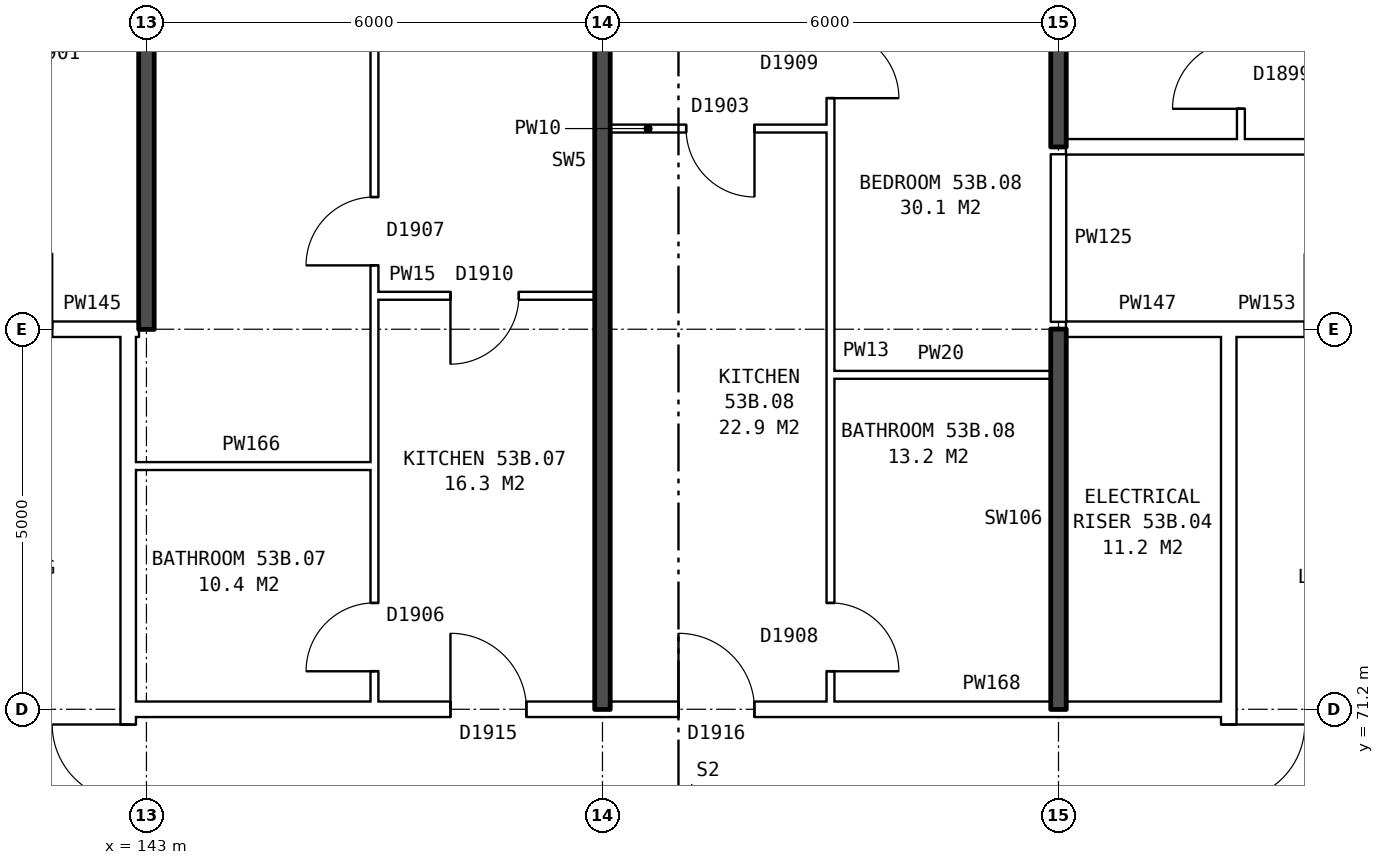
"""IFC4 building model, lengths in metres.
Left out: names, types, materials, properties, quantities, classifications, styles, units other than length and angle.
Written with IfcOpenShell. Run it as: python <this file> out.ifc"""

import sys

from ifc_helpers import new_model, si_unit, direction, frame, frame_2d, origin, place, context, subcontext, project, spatial, rectangle, extrude, element, fill, save


model = new_model("IFC4")
c1 = context("Model", 3, precision=1e-05, world=origin(), true_north=direction((0.0, 1.0)))
c2 = subcontext(c1, "Body", "Model", "MODEL_VIEW")
j1 = project(units=[si_unit("LENGTHUNIT", "METRE"), si_unit("PLANEANGLEUNIT", "RADIAN")], contexts=[c1])
p1 = place(None, origin())
s1 = spatial("IfcSite", under=j1, at=p1, CompositionType="ELEMENT")
p2 = place(p1, origin())
s2 = spatial("IfcBuilding", under=s1, at=p2, CompositionType="ELEMENT")
p3 = place(p2, frame((0.0, 0.0, 188.2)))
s3 = spatial("IfcBuildingStorey", under=s2, at=p3, CompositionType="ELEMENT", Elevation=188.2)
p4 = place(p3, frame((142.76, 63.9, 0.0), z_axis=(0.0, 0.0, 1.0), x_axis=(0.0, 1.0, 0.0)))
e1 = element("IfcWall", 1, at=p4, inside=s3, PredefinedType="PARTITIONING", context=c2, shape_type="SweptSolid", body=[
    extrude(rectangle(XDim=12.2, YDim=0.2, at=frame_2d((6.1, 0.0))), origin(), (0.0, 0.0, 1.0), 2.85),
])
p5 = place(p4, frame((5.1, 0.0, 0.0)))
e2 = element("IfcOpeningElement", 2, at=p5, cuts=e1, PredefinedType="OPENING", context=c2, shape_type="SweptSolid", body=[
    extrude(rectangle(XDim=2.0, YDim=2.1, at=frame_2d((1.0, 1.05))), frame((0.0, 0.11, 0.0), z_axis=(0.0, -1.0, 0.0), x_axis=(1.0, 0.0, 0.0)), (0.0, 0.0, 1.0), 0.22),
])
p6 = place(p3, frame((157.24, 63.9, 0.0), z_axis=(0.0, 0.0, 1.0), x_axis=(0.0, 1.0, 0.0)))
e3 = element("IfcWall", 3, at=p6, inside=s3, PredefinedType="PARTITIONING", context=c2, shape_type="SweptSolid", body=[
    extrude(rectangle(XDim=12.2, YDim=0.2, at=frame_2d((6.1, 0.0))), origin(), (0.0, 0.0, 1.0), 2.85),
])
p7 = place(p6, frame((5.1, 0.0, 0.0)))
e4 = element("IfcOpeningElement", 4, at=p7, cuts=e3, PredefinedType="OPENING", context=c2, shape_type="SweptSolid", body=[
    extrude(rectangle(XDim=2.0, YDim=2.1, at=frame_2d((1.0, 1.05))), frame((0.0, 0.11, 0.0), z_axis=(0.0, -1.0, 0.0), x_axis=(1.0, 0.0, 0.0)), (0.0, 0.0, 1.0), 0.22),
])
p8 = place(p3, frame((142.76, 71.2, 0.0), z_axis=(0.0, 0.0, 1.0), x_axis=(1.0, 0.0, 0.0)))
e5 = element("IfcWall", 5, at=p8, inside=s3, PredefinedType="PARTITIONING", context=c2, shape_type="SweptSolid", body=[
    extrude(rectangle(XDim=14.48, YDim=0.2, at=frame_2d((7.24, 0.0))), origin(), (0.0, 0.0, 1.0), 2.85),
])
p9 = place(p8, frame((4.24, 0.0, 0.0)))
e6 = element("IfcOpeningElement", 6, at=p9, cuts=e5, PredefinedType="OPENING", context=c2, shape_type="SweptSolid", body=[
    extrude(rectangle(XDim=1.0, YDim=2.1, at=frame_2d((0.5, 1.05))), frame((0.0, 0.11, 0.0), z_axis=(0.0, -1.0, 0.0), x_axis=(1.0, 0.0, 0.0)), (0.0, 0.0, 1.0), 0.22),
])
p10 = place(p8, frame((7.24, 0.0, 0.0)))
e7 = element("IfcOpeningElement", 7, at=p10, cuts=e5, PredefinedType="OPENING", context=c2, shape_type="SweptSolid", body=[
    extrude(rectangle(XDim=1.0, YDim=2.1, at=frame_2d((0.5, 1.05))), frame((0.0, 0.11, 0.0), z_axis=(0.0, -1.0, 0.0), x_axis=(1.0, 0.0, 0.0)), (0.0, 0.0, 1.0), 0.22),
])
p11 = place(p3, frame((142.76, 74.4, 0.0), z_axis=(0.0, 0.0, 1.0), x_axis=(1.0, 0.0, 0.0)))
e8 = element("IfcWall", 8, at=p11, inside=s3, PredefinedType="PARTITIONING", context=c2, shape_type="SweptSolid", body=[
    extrude(rectangle(XDim=3.24, YDim=0.1, at=frame_2d((1.62, 0.0))), origin(), (0.0, 0.0, 1.0), 2.85),
])
p12 = place(p3, frame((152.0, 75.6, 0.0), z_axis=(0.0, 0.0, 1.0), x_axis=(1.0, 0.0, 0.0)))
e9 = element("IfcWall", 9, at=p12, inside=s3, PredefinedType="PARTITIONING", context=c2, shape_type="SweptSolid", body=[
    extrude(rectangle(XDim=2.9, YDim=0.1, at=frame_2d((1.45, 0.0))), origin(), (0.0, 0.0, 1.0), 2.85),
])
p13 = place(p3, frame((139.76, 76.2, 0.0), z_axis=(0.0, 0.0, 1.0), x_axis=(1.0, 0.0, 0.0)))
e10 = element("IfcWall", 10, at=p13, inside=s3, PredefinedType="PARTITIONING", context=c2, shape_type="SweptSolid", body=[
    extrude(rectangle(XDim=3.0, YDim=0.2, at=frame_2d((1.5, 0.0))), origin(), (0.0, 0.0, 1.0), 2.85),
])
p14 = place(p13, frame((1.0, 0.0, 0.0)))
e11 = element("IfcOpeningElement", 11, at=p14, cuts=e10, PredefinedType="OPENING", context=c2, shape_type="SweptSolid", body=[
    extrude(rectangle(XDim=1.0, YDim=2.1, at=frame_2d((0.5, 1.05))), frame((0.0, 0.11, 0.0), z_axis=(0.0, -1.0, 0.0), x_axis=(1.0, 0.0, 0.0)), (0.0, 0.0, 1.0), 0.22),
])
p15 = place(p3, frame((142.76, 76.2, 0.0), z_axis=(0.0, 0.0, 1.0), x_axis=(1.0, 0.0, 0.0)))
e12 = element("IfcWall", 12, at=p15, inside=s3, PredefinedType="PARTITIONING", context=c2, shape_type="SweptSolid", body=[
    extrude(rectangle(XDim=0.14, YDim=0.2, at=frame_2d((0.07, 0.0))), origin(), (0.0, 0.0, 1.0), 2.85),
])
p16 = place(p3, frame((155.1, 76.2, 0.0), z_axis=(0.0, 0.0, 1.0), x_axis=(1.0, 0.0, 0.0)))
e13 = element("IfcWall", 13, at=p16, inside=s3, PredefinedType="PARTITIONING", context=c2, shape_type="SweptSolid", body=[
    extrude(rectangle(XDim=2.14, YDim=0.2, at=frame_2d((1.07, 0.0))), origin(), (0.0, 0.0, 1.0), 2.85),
])
p17 = place(p3, frame((157.24, 76.2, 0.0), z_axis=(0.0, 0.0, 1.0), x_axis=(1.0, 0.0, 0.0)))
e14 = element("IfcWall", 14, at=p17, inside=s3, PredefinedType="PARTITIONING", context=c2, shape_type="SweptSolid", body=[
    extrude(rectangle(XDim=3.0, YDim=0.2, at=frame_2d((1.5, 0.0))), origin(), (0.0, 0.0, 1.0), 2.85),
])
p18 = place(p17, frame((1.0, 0.0, 0.0)))
e15 = element("IfcOpeningElement", 15, at=p18, cuts=e14, PredefinedType="OPENING", context=c2, shape_type="SweptSolid", body=[
    extrude(rectangle(XDim=1.0, YDim=2.1, at=frame_2d((0.5, 1.05))), frame((0.0, 0.11, 0.0), z_axis=(0.0, -1.0, 0.0), x_axis=(1.0, 0.0, 0.0)), (0.0, 0.0, 1.0), 0.22),
])
p19 = place(p3, frame((146.0, 76.64, 0.0), z_axis=(0.0, 0.0, 1.0), x_axis=(1.0, 0.0, 0.0)))
e16 = element("IfcWall", 16, at=p19, inside=s3, PredefinedType="PARTITIONING", context=c2, shape_type="SweptSolid", body=[
    extrude(rectangle(XDim=2.9, YDim=0.1, at=frame_2d((1.45, 0.0))), origin(), (0.0, 0.0, 1.0), 2.85),
])
p20 = place(p19, frame((1.0, 0.0, 0.0)))
e17 = element("IfcOpeningElement", 17, at=p20, cuts=e16, PredefinedType="OPENING", context=c2, shape_type="SweptSolid", body=[
    extrude(rectangle(XDim=0.9, YDim=2.1, at=frame_2d((0.45, 1.05))), frame((0.0, 0.06, 0.0), z_axis=(0.0, -1.0, 0.0), x_axis=(1.0, 0.0, 0.0)), (0.0, 0.0, 1.0), 0.12),
])
p21 = place(p3, frame((155.1, 78.6, 0.0), z_axis=(0.0, 0.0, 1.0), x_axis=(1.0, 0.0, 0.0)))
e18 = element("IfcWall", 18, at=p21, inside=s3, PredefinedType="PARTITIONING", context=c2, shape_type="SweptSolid", body=[
    extrude(rectangle(XDim=14.79, YDim=0.2, at=frame_2d((7.395, 0.0))), origin(), (0.0, 0.0, 1.0), 2.85),
])
p22 = place(p21, frame((3.6, 0.0, 0.0)))
e19 = element("IfcOpeningElement", 19, at=p22, cuts=e18, PredefinedType="OPENING", context=c2, shape_type="SweptSolid", body=[
    extrude(rectangle(XDim=1.0, YDim=2.1, at=frame_2d((0.5, 1.05))), frame((0.0, 0.11, 0.0), z_axis=(0.0, -1.0, 0.0), x_axis=(1.0, 0.0, 0.0)), (0.0, 0.0, 1.0), 0.22),
])
p23 = place(p21, frame((7.2, 0.0, 0.0)))
e20 = element("IfcOpeningElement", 20, at=p23, cuts=e18, PredefinedType="OPENING", context=c2, shape_type="SweptSolid", body=[
    extrude(rectangle(XDim=1.0, YDim=2.1, at=frame_2d((0.5, 1.05))), frame((0.0, 0.11, 0.0), z_axis=(0.0, -1.0, 0.0), x_axis=(1.0, 0.0, 0.0)), (0.0, 0.0, 1.0), 0.22),
])
p24 = place(p3, frame((149.1, 78.84, 0.0), z_axis=(0.0, 0.0, 1.0), x_axis=(1.0, 0.0, 0.0)))
e21 = element("IfcWall", 21, at=p24, inside=s3, PredefinedType="PARTITIONING", context=c2, shape_type="SweptSolid", body=[
    extrude(rectangle(XDim=2.9, YDim=0.1, at=frame_2d((1.45, 0.0))), origin(), (0.0, 0.0, 1.0), 2.85),
])
p25 = place(p24, frame((1.0, 0.0, 0.0)))
e22 = element("IfcOpeningElement", 22, at=p25, cuts=e21, PredefinedType="OPENING", context=c2, shape_type="SweptSolid", body=[
    extrude(rectangle(XDim=0.9, YDim=2.1, at=frame_2d((0.45, 1.05))), frame((0.0, 0.06, 0.0), z_axis=(0.0, -1.0, 0.0), x_axis=(1.0, 0.0, 0.0)), (0.0, 0.0, 1.0), 0.12),
])
p26 = place(p3, frame((143.0, 76.2, 0.0), z_axis=(0.0, 0.0, 1.0), x_axis=(0.0, 1.0, 0.0)))
e23 = element("IfcWall", 23, at=p26, inside=s3, PredefinedType="SOLIDWALL", context=c2, shape_type="SweptSolid", body=[
    extrude(rectangle(XDim=9.44, YDim=0.2, at=frame_2d((4.72, 0.0))), origin(), (0.0, 0.0, 1.0), 2.85),
])
p27 = place(p3, frame((146.0, 71.3, 0.0), z_axis=(0.0, 0.0, 1.0), x_axis=(0.0, 1.0, 0.0)))
e24 = element("IfcWall", 24, at=p27, inside=s3, PredefinedType="PARTITIONING", context=c2, shape_type="SweptSolid", body=[
    extrude(rectangle(XDim=14.34, YDim=0.1, at=frame_2d((7.17, 0.0))), origin(), (0.0, 0.0, 1.0), 2.85),
])
p28 = place(p27, frame((5.74, 0.0, 0.0)))
e25 = element("IfcOpeningElement", 25, at=p28, cuts=e24, PredefinedType="OPENING", context=c2, shape_type="SweptSolid", body=[
    extrude(rectangle(XDim=0.9, YDim=2.1, at=frame_2d((0.45, 1.05))), frame((0.0, 0.06, 0.0), z_axis=(0.0, -1.0, 0.0), x_axis=(1.0, 0.0, 0.0)), (0.0, 0.0, 1.0), 0.12),
])
p29 = place(p27, frame((0.4, 0.0, 0.0)))
e26 = element("IfcOpeningElement", 26, at=p29, cuts=e24, PredefinedType="OPENING", context=c2, shape_type="SweptSolid", body=[
    extrude(rectangle(XDim=0.9, YDim=2.1, at=frame_2d((0.45, 1.05))), frame((0.0, 0.06, 0.0), z_axis=(0.0, -1.0, 0.0), x_axis=(1.0, 0.0, 0.0)), (0.0, 0.0, 1.0), 0.12),
])
p30 = place(p3, frame((149.0, 71.2, 0.0), z_axis=(0.0, 0.0, 1.0), x_axis=(0.0, 1.0, 0.0)))
e27 = element("IfcWall", 27, at=p30, inside=s3, PredefinedType="SOLIDWALL", context=c2, shape_type="SweptSolid", body=[
    extrude(rectangle(XDim=14.44, YDim=0.2, at=frame_2d((7.22, 0.0))), origin(), (0.0, 0.0, 1.0), 2.85),
])
p31 = place(p3, frame((152.0, 71.3, 0.0), z_axis=(0.0, 0.0, 1.0), x_axis=(0.0, 1.0, 0.0)))
e28 = element("IfcWall", 28, at=p31, inside=s3, PredefinedType="PARTITIONING", context=c2, shape_type="SweptSolid", body=[
    extrude(rectangle(XDim=14.34, YDim=0.1, at=frame_2d((7.17, 0.0))), origin(), (0.0, 0.0, 1.0), 2.85),
])
p32 = place(p31, frame((7.94, 0.0, 0.0)))
e29 = element("IfcOpeningElement", 29, at=p32, cuts=e28, PredefinedType="OPENING", context=c2, shape_type="SweptSolid", body=[
    extrude(rectangle(XDim=0.9, YDim=2.1, at=frame_2d((0.45, 1.05))), frame((0.0, 0.06, 0.0), z_axis=(0.0, -1.0, 0.0), x_axis=(1.0, 0.0, 0.0)), (0.0, 0.0, 1.0), 0.12),
])
p33 = place(p31, frame((0.4, 0.0, 0.0)))
e30 = element("IfcOpeningElement", 30, at=p33, cuts=e28, PredefinedType="OPENING", context=c2, shape_type="SweptSolid", body=[
    extrude(rectangle(XDim=0.9, YDim=2.1, at=frame_2d((0.45, 1.05))), frame((0.0, 0.06, 0.0), z_axis=(0.0, -1.0, 0.0), x_axis=(1.0, 0.0, 0.0)), (0.0, 0.0, 1.0), 0.12),
])
p34 = place(p3, frame((155.0, 71.2, 0.0), z_axis=(0.0, 0.0, 1.0), x_axis=(0.0, 1.0, 0.0)))
e31 = element("IfcWall", 31, at=p34, inside=s3, PredefinedType="SOLIDWALL", context=c2, shape_type="SweptSolid", body=[
    extrude(rectangle(XDim=5.0, YDim=0.2, at=frame_2d((2.5, 0.0))), origin(), (0.0, 0.0, 1.0), 2.85),
])
p35 = place(p3, frame((155.0, 76.3, 0.0), z_axis=(0.0, 0.0, 1.0), x_axis=(0.0, 1.0, 0.0)))
e32 = element("IfcWall", 32, at=p35, inside=s3, PredefinedType="PARTITIONING", context=c2, shape_type="SweptSolid", body=[
    extrude(rectangle(XDim=2.2, YDim=0.2, at=frame_2d((1.1, 0.0))), origin(), (0.0, 0.0, 1.0), 2.85),
])
p36 = place(p3, frame((155.0, 78.6, 0.0), z_axis=(0.0, 0.0, 1.0), x_axis=(0.0, 1.0, 0.0)))
e33 = element("IfcWall", 33, at=p36, inside=s3, PredefinedType="SOLIDWALL", context=c2, shape_type="SweptSolid", body=[
    extrude(rectangle(XDim=7.04, YDim=0.2, at=frame_2d((3.52, 0.0))), origin(), (0.0, 0.0, 1.0), 2.85),
])
p37 = place(p3, frame((157.4, 78.7, 0.0), z_axis=(0.0, 0.0, 1.0), x_axis=(0.0, 1.0, 0.0)))
e34 = element("IfcWall", 34, at=p37, inside=s3, PredefinedType="PARTITIONING", context=c2, shape_type="SweptSolid", body=[
    extrude(rectangle(XDim=2.85, YDim=0.1, at=frame_2d((1.425, 0.0))), origin(), (0.0, 0.0, 1.0), 2.85),
])
p38 = place(p37, frame((0.4, 0.0, 0.0)))
e35 = element("IfcOpeningElement", 35, at=p38, cuts=e34, PredefinedType="OPENING", context=c2, shape_type="SweptSolid", body=[
    extrude(rectangle(XDim=0.9, YDim=2.1, at=frame_2d((0.45, 1.05))), frame((0.0, 0.06, 0.0), z_axis=(0.0, -1.0, 0.0), x_axis=(1.0, 0.0, 0.0)), (0.0, 0.0, 1.0), 0.12),
])
p39 = place(p5, origin())
e36 = element("IfcDoor", 36, at=p39, inside=s3, OperationType="DOUBLE_DOOR_SINGLE_SWING", PredefinedType="DOOR", context=c2, shape_type="SweptSolid", body=[
    extrude(rectangle(XDim=2.0, YDim=2.1, at=frame_2d((1.0, 1.05))), frame((0.0, 0.025, 0.0), z_axis=(0.0, -1.0, 0.0), x_axis=(1.0, 0.0, 0.0)), (0.0, 0.0, 1.0), 0.05),
])
fill(e2, e36)
p40 = place(p7, frame((2.0, 0.0, 0.0), z_axis=(0.0, 0.0, 1.0), x_axis=(-1.0, 0.0, 0.0)))
e37 = element("IfcDoor", 37, at=p40, inside=s3, OperationType="DOUBLE_DOOR_SINGLE_SWING", PredefinedType="DOOR", context=c2, shape_type="SweptSolid", body=[
    extrude(rectangle(XDim=2.0, YDim=2.1, at=frame_2d((1.0, 1.05))), frame((0.0, 0.025, 0.0), z_axis=(0.0, -1.0, 0.0), x_axis=(1.0, 0.0, 0.0)), (0.0, 0.0, 1.0), 0.05),
])
fill(e4, e37)
p41 = place(p28, origin())
e38 = element("IfcDoor", 38, at=p41, inside=s3, OperationType="SINGLE_SWING_LEFT", PredefinedType="DOOR", context=c2, shape_type="SweptSolid", body=[
    extrude(rectangle(XDim=0.9, YDim=2.1, at=frame_2d((0.45, 1.05))), frame((0.0, 0.025, 0.0), z_axis=(0.0, -1.0, 0.0), x_axis=(1.0, 0.0, 0.0)), (0.0, 0.0, 1.0), 0.05),
])
fill(e25, e38)
p42 = place(p9, origin())
e39 = element("IfcDoor", 39, at=p42, inside=s3, OperationType="SINGLE_SWING_LEFT", PredefinedType="DOOR", context=c2, shape_type="SweptSolid", body=[
    extrude(rectangle(XDim=1.0, YDim=2.1, at=frame_2d((0.5, 1.05))), frame((0.0, 0.025, 0.0), z_axis=(0.0, -1.0, 0.0), x_axis=(1.0, 0.0, 0.0)), (0.0, 0.0, 1.0), 0.05),
])
fill(e6, e39)
p43 = place(p20, frame((0.9, 0.0, 0.0), z_axis=(0.0, 0.0, 1.0), x_axis=(-1.0, 0.0, 0.0)))
e40 = element("IfcDoor", 40, at=p43, inside=s3, OperationType="SINGLE_SWING_RIGHT", PredefinedType="DOOR", context=c2, shape_type="SweptSolid", body=[
    extrude(rectangle(XDim=0.9, YDim=2.1, at=frame_2d((0.45, 1.05))), frame((0.0, 0.025, 0.0), z_axis=(0.0, -1.0, 0.0), x_axis=(1.0, 0.0, 0.0)), (0.0, 0.0, 1.0), 0.05),
])
fill(e17, e40)
p44 = place(p29, origin())
e41 = element("IfcDoor", 41, at=p44, inside=s3, OperationType="SINGLE_SWING_LEFT", PredefinedType="DOOR", context=c2, shape_type="SweptSolid", body=[
    extrude(rectangle(XDim=0.9, YDim=2.1, at=frame_2d((0.45, 1.05))), frame((0.0, 0.025, 0.0), z_axis=(0.0, -1.0, 0.0), x_axis=(1.0, 0.0, 0.0)), (0.0, 0.0, 1.0), 0.05),
])
fill(e26, e41)
p45 = place(p32, frame((0.9, 0.0, 0.0), z_axis=(0.0, 0.0, 1.0), x_axis=(-1.0, 0.0, 0.0)))
e42 = element("IfcDoor", 42, at=p45, inside=s3, OperationType="SINGLE_SWING_RIGHT", PredefinedType="DOOR", context=c2, shape_type="SweptSolid", body=[
    extrude(rectangle(XDim=0.9, YDim=2.1, at=frame_2d((0.45, 1.05))), frame((0.0, 0.025, 0.0), z_axis=(0.0, -1.0, 0.0), x_axis=(1.0, 0.0, 0.0)), (0.0, 0.0, 1.0), 0.05),
])
fill(e29, e42)
p46 = place(p10, origin())
e43 = element("IfcDoor", 43, at=p46, inside=s3, OperationType="SINGLE_SWING_LEFT", PredefinedType="DOOR", context=c2, shape_type="SweptSolid", body=[
    extrude(rectangle(XDim=1.0, YDim=2.1, at=frame_2d((0.5, 1.05))), frame((0.0, 0.025, 0.0), z_axis=(0.0, -1.0, 0.0), x_axis=(1.0, 0.0, 0.0)), (0.0, 0.0, 1.0), 0.05),
])
fill(e7, e43)
p47 = place(p25, frame((0.9, 0.0, 0.0), z_axis=(0.0, 0.0, 1.0), x_axis=(-1.0, 0.0, 0.0)))
e44 = element("IfcDoor", 44, at=p47, inside=s3, OperationType="SINGLE_SWING_LEFT", PredefinedType="DOOR", context=c2, shape_type="SweptSolid", body=[
    extrude(rectangle(XDim=0.9, YDim=2.1, at=frame_2d((0.45, 1.05))), frame((0.0, 0.025, 0.0), z_axis=(0.0, -1.0, 0.0), x_axis=(1.0, 0.0, 0.0)), (0.0, 0.0, 1.0), 0.05),
])
fill(e22, e44)
p48 = place(p33, frame((0.9, 0.0, 0.0), z_axis=(0.0, 0.0, 1.0), x_axis=(-1.0, 0.0, 0.0)))
e45 = element("IfcDoor", 45, at=p48, inside=s3, OperationType="SINGLE_SWING_RIGHT", PredefinedType="DOOR", context=c2, shape_type="SweptSolid", body=[
    extrude(rectangle(XDim=0.9, YDim=2.1, at=frame_2d((0.45, 1.05))), frame((0.0, 0.025, 0.0), z_axis=(0.0, -1.0, 0.0), x_axis=(1.0, 0.0, 0.0)), (0.0, 0.0, 1.0), 0.05),
])
fill(e30, e45)
p49 = place(p38, origin())
e46 = element("IfcDoor", 46, at=p49, inside=s3, OperationType="SINGLE_SWING_LEFT", PredefinedType="DOOR", context=c2, shape_type="SweptSolid", body=[
    extrude(rectangle(XDim=0.9, YDim=2.1, at=frame_2d((0.45, 1.05))), frame((0.0, 0.025, 0.0), z_axis=(0.0, -1.0, 0.0), x_axis=(1.0, 0.0, 0.0)), (0.0, 0.0, 1.0), 0.05),
])
fill(e35, e46)
save(model, sys.argv[1])
